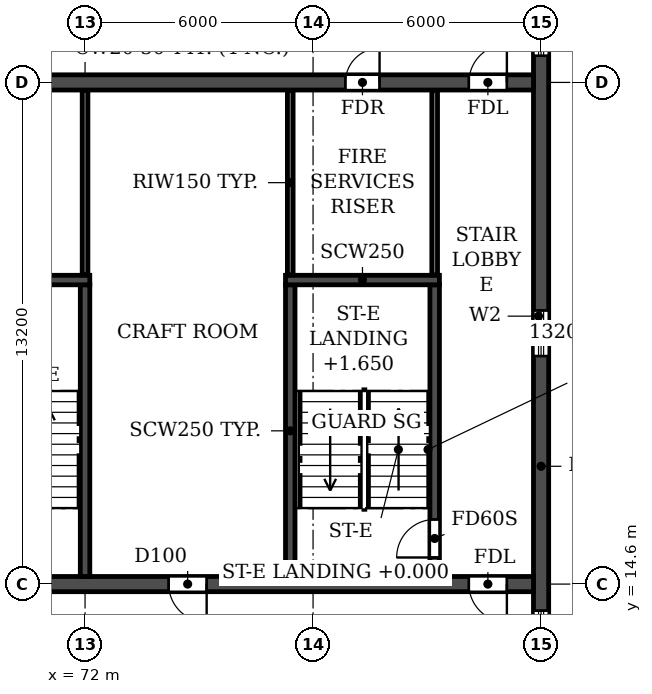
"""IFC4 building model, lengths in metres.
Left out: names, types, materials, properties, quantities, classifications, styles, units other than length and angle.
Written with IfcOpenShell. Run it as: python <this file> out.ifc"""

import sys

from ifc_helpers import new_model, si_unit, direction, frame, frame_2d, origin, place, context, subcontext, project, spatial, rectangle, extrude, element, fill, save


model = new_model("IFC4")
c1 = context("Model", 3, precision=1e-05, world=origin(), true_north=direction((0.0, 1.0)))
c2 = subcontext(c1, "Body", "Model", "MODEL_VIEW")
j1 = project(units=[si_unit("LENGTHUNIT", "METRE"), si_unit("PLANEANGLEUNIT", "RADIAN")], contexts=[c1])
p1 = place(None, origin())
s1 = spatial("IfcSite", under=j1, at=p1, CompositionType="ELEMENT")
p2 = place(p1, origin())
s2 = spatial("IfcBuilding", under=s1, at=p2, CompositionType="ELEMENT")
p3 = place(p2, frame((0.0, 0.0, 181.8)))
s3 = spatial("IfcBuildingStorey", under=s2, at=p3, CompositionType="ELEMENT", Elevation=181.8)
p4 = place(p3, frame((84.0, 4.683, 0.0), z_axis=(0.0, 0.0, 1.0), x_axis=(0.0, 1.0, 0.0)))
e1 = element("IfcWall", 1, at=p4, inside=s3, PredefinedType="SHEAR", context=c2, shape_type="SweptSolid", body=[
    extrude(rectangle(XDim=31.834, YDim=0.4, at=frame_2d((15.917, 0.0))), origin(), (0.0, 0.0, 1.0), 3.08),
])
p5 = place(p4, frame((23.817, 0.0, 0.9)))
e2 = element("IfcOpeningElement", 2, at=p5, cuts=e1, PredefinedType="OPENING", context=c2, shape_type="SweptSolid", body=[
    extrude(rectangle(XDim=1.2, YDim=1.5, at=frame_2d((0.6, 0.75))), frame((0.0, 0.21, 0.0), z_axis=(0.0, -1.0, 0.0), x_axis=(1.0, 0.0, 0.0)), (0.0, 0.0, 1.0), 0.42),
])
p6 = place(p4, frame((8.017, 0.0, 0.9)))
e3 = element("IfcOpeningElement", 3, at=p6, cuts=e1, PredefinedType="OPENING", context=c2, shape_type="SweptSolid", body=[
    extrude(rectangle(XDim=1.2, YDim=1.5, at=frame_2d((0.6, 0.75))), frame((0.0, 0.21, 0.0), z_axis=(0.0, -1.0, 0.0), x_axis=(1.0, 0.0, 0.0)), (0.0, 0.0, 1.0), 0.42),
])
p7 = place(p4, frame((27.694, 0.0, 0.6)))
e4 = element("IfcOpeningElement", 4, at=p7, cuts=e1, PredefinedType="OPENING", context=c2, shape_type="SweptSolid", body=[
    extrude(rectangle(XDim=2.2, YDim=1.8, at=frame_2d((1.1, 0.9))), frame((0.0, 0.21, 0.0), z_axis=(0.0, -1.0, 0.0), x_axis=(1.0, 0.0, 0.0)), (0.0, 0.0, 1.0), 0.42),
])
p8 = place(p4, frame((2.541, 0.0, 0.6)))
e5 = element("IfcOpeningElement", 5, at=p8, cuts=e1, PredefinedType="OPENING", context=c2, shape_type="SweptSolid", body=[
    extrude(rectangle(XDim=2.2, YDim=1.8, at=frame_2d((1.1, 0.9))), frame((0.0, 0.21, 0.0), z_axis=(0.0, -1.0, 0.0), x_axis=(1.0, 0.0, 0.0)), (0.0, 0.0, 1.0), 0.42),
])
p9 = place(p4, frame((15.917, 0.0, 0.9)))
e6 = element("IfcOpeningElement", 6, at=p9, cuts=e1, PredefinedType="OPENING", context=c2, shape_type="SweptSolid", body=[
    extrude(rectangle(XDim=1.2, YDim=1.5, at=frame_2d((0.6, 0.75))), frame((0.0, 0.21, 0.0), z_axis=(0.0, -1.0, 0.0), x_axis=(1.0, 0.0, 0.0)), (0.0, 0.0, 1.0), 0.42),
])
p10 = place(p3, frame((18.2, 14.6, 0.0), z_axis=(0.0, 0.0, 1.0), x_axis=(1.0, 0.0, 0.0)))
e7 = element("IfcWall", 7, at=p10, inside=s3, PredefinedType="SOLIDWALL", context=c2, shape_type="SweptSolid", body=[
    extrude(rectangle(XDim=65.6, YDim=0.4, at=frame_2d((32.8, 0.0))), origin(), (0.0, 0.0, 1.0), 3.08),
])
p11 = place(p10, frame((0.7, 0.0, 0.0)))
e8 = element("IfcOpeningElement", 8, at=p11, cuts=e7, PredefinedType="OPENING", context=c2, shape_type="SweptSolid", body=[
    extrude(rectangle(XDim=1.0, YDim=2.1, at=frame_2d((0.5, 1.05))), frame((0.0, 0.21, 0.0), z_axis=(0.0, -1.0, 0.0), x_axis=(1.0, 0.0, 0.0)), (0.0, 0.0, 1.0), 0.42),
])
p12 = place(p10, frame((8.6, 0.0, 0.0)))
e9 = element("IfcOpeningElement", 9, at=p12, cuts=e7, PredefinedType="OPENING", context=c2, shape_type="SweptSolid", body=[
    extrude(rectangle(XDim=1.0, YDim=2.1, at=frame_2d((0.5, 1.05))), frame((0.0, 0.21, 0.0), z_axis=(0.0, -1.0, 0.0), x_axis=(1.0, 0.0, 0.0)), (0.0, 0.0, 1.0), 0.42),
])
p13 = place(p10, frame((13.2, 0.0, 0.0)))
e10 = element("IfcOpeningElement", 10, at=p13, cuts=e7, PredefinedType="OPENING", context=c2, shape_type="SweptSolid", body=[
    extrude(rectangle(XDim=1.0, YDim=2.1, at=frame_2d((0.5, 1.05))), frame((0.0, 0.21, 0.0), z_axis=(0.0, -1.0, 0.0), x_axis=(1.0, 0.0, 0.0)), (0.0, 0.0, 1.0), 0.42),
])
p14 = place(p10, frame((24.5, 0.0, 0.0)))
e11 = element("IfcOpeningElement", 11, at=p14, cuts=e7, PredefinedType="OPENING", context=c2, shape_type="SweptSolid", body=[
    extrude(rectangle(XDim=1.0, YDim=2.1, at=frame_2d((0.5, 1.05))), frame((0.0, 0.21, 0.0), z_axis=(0.0, -1.0, 0.0), x_axis=(1.0, 0.0, 0.0)), (0.0, 0.0, 1.0), 0.42),
])
p15 = place(p10, frame((28.4, 0.0, 0.0)))
e12 = element("IfcOpeningElement", 12, at=p15, cuts=e7, PredefinedType="OPENING", context=c2, shape_type="SweptSolid", body=[
    extrude(rectangle(XDim=1.0, YDim=2.1, at=frame_2d((0.5, 1.05))), frame((0.0, 0.21, 0.0), z_axis=(0.0, -1.0, 0.0), x_axis=(1.0, 0.0, 0.0)), (0.0, 0.0, 1.0), 0.42),
])
p16 = place(p10, frame((32.3, 0.0, 0.0)))
e13 = element("IfcOpeningElement", 13, at=p16, cuts=e7, PredefinedType="OPENING", context=c2, shape_type="SweptSolid", body=[
    extrude(rectangle(XDim=1.0, YDim=2.1, at=frame_2d((0.5, 1.05))), frame((0.0, 0.21, 0.0), z_axis=(0.0, -1.0, 0.0), x_axis=(1.0, 0.0, 0.0)), (0.0, 0.0, 1.0), 0.42),
])
p17 = place(p10, frame((34.9, 0.0, 0.0)))
e14 = element("IfcOpeningElement", 14, at=p17, cuts=e7, PredefinedType="OPENING", context=c2, shape_type="SweptSolid", body=[
    extrude(rectangle(XDim=1.0, YDim=2.1, at=frame_2d((0.5, 1.05))), frame((0.0, 0.21, 0.0), z_axis=(0.0, -1.0, 0.0), x_axis=(1.0, 0.0, 0.0)), (0.0, 0.0, 1.0), 0.42),
])
p18 = place(p10, frame((38.8, 0.0, 0.0)))
e15 = element("IfcOpeningElement", 15, at=p18, cuts=e7, PredefinedType="OPENING", context=c2, shape_type="SweptSolid", body=[
    extrude(rectangle(XDim=1.0, YDim=2.1, at=frame_2d((0.5, 1.05))), frame((0.0, 0.21, 0.0), z_axis=(0.0, -1.0, 0.0), x_axis=(1.0, 0.0, 0.0)), (0.0, 0.0, 1.0), 0.42),
])
p19 = place(p10, frame((51.4, 0.0, 0.0)))
e16 = element("IfcOpeningElement", 16, at=p19, cuts=e7, PredefinedType="OPENING", context=c2, shape_type="SweptSolid", body=[
    extrude(rectangle(XDim=1.0, YDim=2.1, at=frame_2d((0.5, 1.05))), frame((0.0, 0.21, 0.0), z_axis=(0.0, -1.0, 0.0), x_axis=(1.0, 0.0, 0.0)), (0.0, 0.0, 1.0), 0.42),
])
p20 = place(p10, frame((56.0, 0.0, 0.0)))
e17 = element("IfcOpeningElement", 17, at=p20, cuts=e7, PredefinedType="OPENING", context=c2, shape_type="SweptSolid", body=[
    extrude(rectangle(XDim=1.0, YDim=2.1, at=frame_2d((0.5, 1.05))), frame((0.0, 0.21, 0.0), z_axis=(0.0, -1.0, 0.0), x_axis=(1.0, 0.0, 0.0)), (0.0, 0.0, 1.0), 0.42),
])
p21 = place(p10, frame((63.9, 0.0, 0.0)))
e18 = element("IfcOpeningElement", 18, at=p21, cuts=e7, PredefinedType="OPENING", context=c2, shape_type="SweptSolid", body=[
    extrude(rectangle(XDim=1.0, YDim=2.1, at=frame_2d((0.5, 1.05))), frame((0.0, 0.21, 0.0), z_axis=(0.0, -1.0, 0.0), x_axis=(1.0, 0.0, 0.0)), (0.0, 0.0, 1.0), 0.42),
])
p22 = place(p3, frame((18.2, 27.8, 0.0), z_axis=(0.0, 0.0, 1.0), x_axis=(1.0, 0.0, 0.0)))
e19 = element("IfcWall", 19, at=p22, inside=s3, PredefinedType="SOLIDWALL", context=c2, shape_type="SweptSolid", body=[
    extrude(rectangle(XDim=65.6, YDim=0.4, at=frame_2d((32.8, 0.0))), origin(), (0.0, 0.0, 1.0), 3.08),
])
p23 = place(p22, frame((0.7, 0.0, 0.0)))
e20 = element("IfcOpeningElement", 20, at=p23, cuts=e19, PredefinedType="OPENING", context=c2, shape_type="SweptSolid", body=[
    extrude(rectangle(XDim=1.0, YDim=2.1, at=frame_2d((0.5, 1.05))), frame((0.0, 0.21, 0.0), z_axis=(0.0, -1.0, 0.0), x_axis=(1.0, 0.0, 0.0)), (0.0, 0.0, 1.0), 0.42),
])
p24 = place(p22, frame((4.05, 0.0, 0.0)))
e21 = element("IfcOpeningElement", 21, at=p24, cuts=e19, PredefinedType="OPENING", context=c2, shape_type="SweptSolid", body=[
    extrude(rectangle(XDim=0.9, YDim=2.1, at=frame_2d((0.45, 1.05))), frame((0.0, 0.21, 0.0), z_axis=(0.0, -1.0, 0.0), x_axis=(1.0, 0.0, 0.0)), (0.0, 0.0, 1.0), 0.42),
])
p25 = place(p22, frame((13.25, 0.0, 0.0)))
e22 = element("IfcOpeningElement", 22, at=p25, cuts=e19, PredefinedType="OPENING", context=c2, shape_type="SweptSolid", body=[
    extrude(rectangle(XDim=0.9, YDim=2.1, at=frame_2d((0.45, 1.05))), frame((0.0, 0.21, 0.0), z_axis=(0.0, -1.0, 0.0), x_axis=(1.0, 0.0, 0.0)), (0.0, 0.0, 1.0), 0.42),
])
p26 = place(p22, frame((19.0, 0.0, 0.0)))
e23 = element("IfcOpeningElement", 23, at=p26, cuts=e19, PredefinedType="OPENING", context=c2, shape_type="SweptSolid", body=[
    extrude(rectangle(XDim=1.0, YDim=2.1, at=frame_2d((0.5, 1.05))), frame((0.0, 0.21, 0.0), z_axis=(0.0, -1.0, 0.0), x_axis=(1.0, 0.0, 0.0)), (0.0, 0.0, 1.0), 0.42),
])
p27 = place(p22, frame((24.2, 0.0, 0.0)))
e24 = element("IfcOpeningElement", 24, at=p27, cuts=e19, PredefinedType="OPENING", context=c2, shape_type="SweptSolid", body=[
    extrude(rectangle(XDim=1.0, YDim=2.1, at=frame_2d((0.5, 1.05))), frame((0.0, 0.21, 0.0), z_axis=(0.0, -1.0, 0.0), x_axis=(1.0, 0.0, 0.0)), (0.0, 0.0, 1.0), 0.42),
])
p28 = place(p22, frame((29.4, 0.0, 0.0)))
e25 = element("IfcOpeningElement", 25, at=p28, cuts=e19, PredefinedType="OPENING", context=c2, shape_type="SweptSolid", body=[
    extrude(rectangle(XDim=1.0, YDim=2.1, at=frame_2d((0.5, 1.05))), frame((0.0, 0.21, 0.0), z_axis=(0.0, -1.0, 0.0), x_axis=(1.0, 0.0, 0.0)), (0.0, 0.0, 1.0), 0.42),
])
p29 = place(p22, frame((32.3, 0.0, 0.0)))
e26 = element("IfcOpeningElement", 26, at=p29, cuts=e19, PredefinedType="OPENING", context=c2, shape_type="SweptSolid", body=[
    extrude(rectangle(XDim=1.0, YDim=2.1, at=frame_2d((0.5, 1.05))), frame((0.0, 0.21, 0.0), z_axis=(0.0, -1.0, 0.0), x_axis=(1.0, 0.0, 0.0)), (0.0, 0.0, 1.0), 0.42),
])
p30 = place(p22, frame((36.5, 0.0, 0.0)))
e27 = element("IfcOpeningElement", 27, at=p30, cuts=e19, PredefinedType="OPENING", context=c2, shape_type="SweptSolid", body=[
    extrude(rectangle(XDim=1.0, YDim=2.1, at=frame_2d((0.5, 1.05))), frame((0.0, 0.21, 0.0), z_axis=(0.0, -1.0, 0.0), x_axis=(1.0, 0.0, 0.0)), (0.0, 0.0, 1.0), 0.42),
])
p31 = place(p22, frame((40.4, 0.0, 0.0)))
e28 = element("IfcOpeningElement", 28, at=p31, cuts=e19, PredefinedType="OPENING", context=c2, shape_type="SweptSolid", body=[
    extrude(rectangle(XDim=1.0, YDim=2.1, at=frame_2d((0.5, 1.05))), frame((0.0, 0.21, 0.0), z_axis=(0.0, -1.0, 0.0), x_axis=(1.0, 0.0, 0.0)), (0.0, 0.0, 1.0), 0.42),
])
p32 = place(p22, frame((43.0, 0.0, 0.0)))
e29 = element("IfcOpeningElement", 29, at=p32, cuts=e19, PredefinedType="OPENING", context=c2, shape_type="SweptSolid", body=[
    extrude(rectangle(XDim=1.0, YDim=2.1, at=frame_2d((0.5, 1.05))), frame((0.0, 0.21, 0.0), z_axis=(0.0, -1.0, 0.0), x_axis=(1.0, 0.0, 0.0)), (0.0, 0.0, 1.0), 0.42),
])
p33 = place(p22, frame((46.65, 0.0, 0.0)))
e30 = element("IfcOpeningElement", 30, at=p33, cuts=e19, PredefinedType="OPENING", context=c2, shape_type="SweptSolid", body=[
    extrude(rectangle(XDim=1.5, YDim=2.1, at=frame_2d((0.75, 1.05))), frame((0.0, 0.21, 0.0), z_axis=(0.0, -1.0, 0.0), x_axis=(1.0, 0.0, 0.0)), (0.0, 0.0, 1.0), 0.42),
])
p34 = place(p22, frame((51.45, 0.0, 0.0)))
e31 = element("IfcOpeningElement", 31, at=p34, cuts=e19, PredefinedType="OPENING", context=c2, shape_type="SweptSolid", body=[
    extrude(rectangle(XDim=0.9, YDim=2.1, at=frame_2d((0.45, 1.05))), frame((0.0, 0.21, 0.0), z_axis=(0.0, -1.0, 0.0), x_axis=(1.0, 0.0, 0.0)), (0.0, 0.0, 1.0), 0.42),
])
p35 = place(p22, frame((60.65, 0.0, 0.0)))
e32 = element("IfcOpeningElement", 32, at=p35, cuts=e19, PredefinedType="OPENING", context=c2, shape_type="SweptSolid", body=[
    extrude(rectangle(XDim=0.9, YDim=2.1, at=frame_2d((0.45, 1.05))), frame((0.0, 0.21, 0.0), z_axis=(0.0, -1.0, 0.0), x_axis=(1.0, 0.0, 0.0)), (0.0, 0.0, 1.0), 0.42),
])
p36 = place(p22, frame((63.9, 0.0, 0.0)))
e33 = element("IfcOpeningElement", 33, at=p36, cuts=e19, PredefinedType="OPENING", context=c2, shape_type="SweptSolid", body=[
    extrude(rectangle(XDim=1.0, YDim=2.1, at=frame_2d((0.5, 1.05))), frame((0.0, 0.21, 0.0), z_axis=(0.0, -1.0, 0.0), x_axis=(1.0, 0.0, 0.0)), (0.0, 0.0, 1.0), 0.42),
])
p37 = place(p3, frame((72.0, 14.8, 0.0), z_axis=(0.0, 0.0, 1.0), x_axis=(0.0, 1.0, 0.0)))
e34 = element("IfcWall", 34, at=p37, inside=s3, PredefinedType="SOLIDWALL", context=c2, shape_type="SweptSolid", body=[
    extrude(rectangle(XDim=7.675, YDim=0.25, at=frame_2d((3.837, 0.0))), origin(), (0.0, 0.0, 1.0), 3.08),
])
p38 = place(p3, frame((68.075, 22.6, 0.0), z_axis=(0.0, 0.0, 1.0), x_axis=(1.0, 0.0, 0.0)))
e35 = element("IfcWall", 35, at=p38, inside=s3, PredefinedType="SOLIDWALL", context=c2, shape_type="SweptSolid", body=[
    extrude(rectangle(XDim=4.05, YDim=0.25, at=frame_2d((2.025, 0.0))), origin(), (0.0, 0.0, 1.0), 3.08),
])
p39 = place(p3, frame((77.4, 14.8, 0.0), z_axis=(0.0, 0.0, 1.0), x_axis=(0.0, 1.0, 0.0)))
e36 = element("IfcWall", 36, at=p39, inside=s3, PredefinedType="SOLIDWALL", context=c2, shape_type="SweptSolid", body=[
    extrude(rectangle(XDim=7.675, YDim=0.25, at=frame_2d((3.837, 0.0))), origin(), (0.0, 0.0, 1.0), 3.08),
])
p40 = place(p3, frame((81.2, 14.8, 0.0), z_axis=(0.0, 0.0, 1.0), x_axis=(0.0, 1.0, 0.0)))
e37 = element("IfcWall", 37, at=p40, inside=s3, PredefinedType="SOLIDWALL", context=c2, shape_type="SweptSolid", body=[
    extrude(rectangle(XDim=7.675, YDim=0.25, at=frame_2d((3.837, 0.0))), origin(), (0.0, 0.0, 1.0), 3.08),
])
p41 = place(p40, frame((0.5, 0.0, 0.0)))
e38 = element("IfcOpeningElement", 38, at=p41, cuts=e37, PredefinedType="OPENING", context=c2, shape_type="SweptSolid", body=[
    extrude(rectangle(XDim=1.0, YDim=2.1, at=frame_2d((0.5, 1.05))), frame((0.0, 0.135, 0.0), z_axis=(0.0, -1.0, 0.0), x_axis=(1.0, 0.0, 0.0)), (0.0, 0.0, 1.0), 0.27),
])
p42 = place(p3, frame((77.275, 22.6, 0.0), z_axis=(0.0, 0.0, 1.0), x_axis=(1.0, 0.0, 0.0)))
e39 = element("IfcWall", 39, at=p42, inside=s3, PredefinedType="SOLIDWALL", context=c2, shape_type="SweptSolid", body=[
    extrude(rectangle(XDim=4.05, YDim=0.25, at=frame_2d((2.025, 0.0))), origin(), (0.0, 0.0, 1.0), 3.08),
])
for number, where, z_axis, x_axis in (
    (40, (72.0, 22.735, 0.0), (0.0, 0.0, 1.0), (0.0, 1.0, 0.0)),
    (41, (77.4, 22.735, 0.0), (0.0, 0.0, 1.0), (0.0, 1.0, 0.0)),
    (42, (81.2, 22.735, 0.0), (0.0, 0.0, 1.0), (0.0, 1.0, 0.0)),
):
    element("IfcWall", number, at=place(p3, frame(where, z_axis=z_axis, x_axis=x_axis)), inside=s3, PredefinedType="PARTITIONING", context=c2, shape_type="SweptSolid", body=[
        extrude(rectangle(XDim=4.855, YDim=0.15, at=frame_2d((2.427, 0.0))), origin(), (0.0, 0.0, 1.0), 3.08),
    ])
p43 = place(p5, origin())
e43 = element("IfcWindow", 43, at=p43, inside=s3, PartitioningType="SINGLE_PANEL", PredefinedType="WINDOW", context=c2, shape_type="SweptSolid", body=[
    extrude(rectangle(XDim=1.2, YDim=1.5, at=frame_2d((0.6, 0.75))), frame((0.0, 0.03, 0.0), z_axis=(0.0, -1.0, 0.0), x_axis=(1.0, 0.0, 0.0)), (0.0, 0.0, 1.0), 0.06),
])
fill(e2, e43)
p44 = place(p6, origin())
e44 = element("IfcWindow", 44, at=p44, inside=s3, PartitioningType="SINGLE_PANEL", PredefinedType="WINDOW", context=c2, shape_type="SweptSolid", body=[
    extrude(rectangle(XDim=1.2, YDim=1.5, at=frame_2d((0.6, 0.75))), frame((0.0, 0.03, 0.0), z_axis=(0.0, -1.0, 0.0), x_axis=(1.0, 0.0, 0.0)), (0.0, 0.0, 1.0), 0.06),
])
fill(e3, e44)
p45 = place(p9, origin())
e45 = element("IfcWindow", 45, at=p45, inside=s3, PartitioningType="SINGLE_PANEL", PredefinedType="WINDOW", context=c2, shape_type="SweptSolid", body=[
    extrude(rectangle(XDim=1.2, YDim=1.5, at=frame_2d((0.6, 0.75))), frame((0.0, 0.03, 0.0), z_axis=(0.0, -1.0, 0.0), x_axis=(1.0, 0.0, 0.0)), (0.0, 0.0, 1.0), 0.06),
])
fill(e6, e45)
p46 = place(p35, origin())
e46 = element("IfcDoor", 46, at=p46, inside=s3, OperationType="SINGLE_SWING_RIGHT", PredefinedType="DOOR", context=c2, shape_type="SweptSolid", body=[
    extrude(rectangle(XDim=0.9, YDim=2.1, at=frame_2d((0.45, 1.05))), frame((0.0, 0.025, 0.0), z_axis=(0.0, -1.0, 0.0), x_axis=(1.0, 0.0, 0.0)), (0.0, 0.0, 1.0), 0.05),
])
fill(e32, e46)
p47 = place(p36, origin())
e47 = element("IfcDoor", 47, at=p47, inside=s3, OperationType="SINGLE_SWING_RIGHT", PredefinedType="DOOR", context=c2, shape_type="SweptSolid", body=[
    extrude(rectangle(XDim=1.0, YDim=2.1, at=frame_2d((0.5, 1.05))), frame((0.0, 0.025, 0.0), z_axis=(0.0, -1.0, 0.0), x_axis=(1.0, 0.0, 0.0)), (0.0, 0.0, 1.0), 0.05),
])
fill(e33, e47)
p48 = place(p20, frame((1.0, 0.0, 0.0), z_axis=(0.0, 0.0, 1.0), x_axis=(-1.0, 0.0, 0.0)))
e48 = element("IfcDoor", 48, at=p48, inside=s3, OperationType="SINGLE_SWING_LEFT", PredefinedType="DOOR", context=c2, shape_type="SweptSolid", body=[
    extrude(rectangle(XDim=1.0, YDim=2.1, at=frame_2d((0.5, 1.05))), frame((0.0, 0.025, 0.0), z_axis=(0.0, -1.0, 0.0), x_axis=(1.0, 0.0, 0.0)), (0.0, 0.0, 1.0), 0.05),
])
fill(e17, e48)
p49 = place(p21, frame((1.0, 0.0, 0.0), z_axis=(0.0, 0.0, 1.0), x_axis=(-1.0, 0.0, 0.0)))
e49 = element("IfcDoor", 49, at=p49, inside=s3, OperationType="SINGLE_SWING_LEFT", PredefinedType="DOOR", context=c2, shape_type="SweptSolid", body=[
    extrude(rectangle(XDim=1.0, YDim=2.1, at=frame_2d((0.5, 1.05))), frame((0.0, 0.025, 0.0), z_axis=(0.0, -1.0, 0.0), x_axis=(1.0, 0.0, 0.0)), (0.0, 0.0, 1.0), 0.05),
])
fill(e18, e49)
p50 = place(p41, origin())
e50 = element("IfcDoor", 50, at=p50, inside=s3, OperationType="SINGLE_SWING_LEFT", PredefinedType="DOOR", context=c2, shape_type="SweptSolid", body=[
    extrude(rectangle(XDim=1.0, YDim=2.1, at=frame_2d((0.5, 1.05))), frame((0.0, 0.025, 0.0), z_axis=(0.0, -1.0, 0.0), x_axis=(1.0, 0.0, 0.0)), (0.0, 0.0, 1.0), 0.05),
])
fill(e38, e50)
save(model, sys.argv[1])
